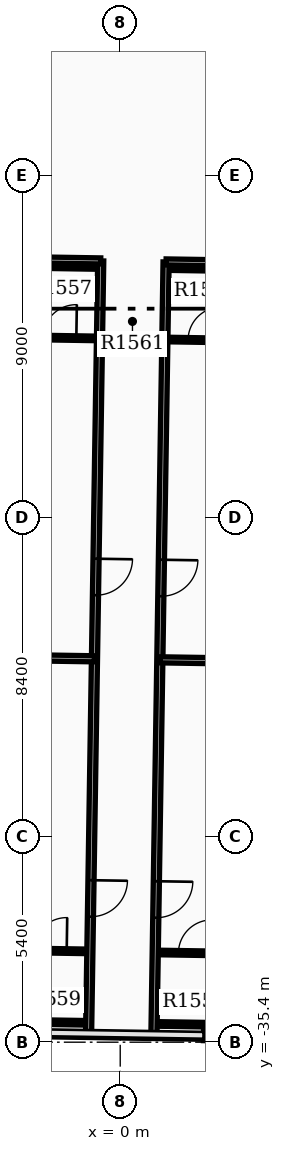
"""IFC4 building model, lengths in metres.
Left out: names, types, materials, properties, quantities, classifications, styles, units other than length and angle.
Written with IfcOpenShell. Run it as: python <this file> out.ifc"""

import sys

from ifc_helpers import new_model, si_unit, direction, frame, frame_2d, origin, place, context, subcontext, project, spatial, rectangle, extrude, element, fill, save


model = new_model("IFC4")
c1 = context("Model", 3, precision=1e-05, world=origin(), true_north=direction((0.0, 1.0)))
c2 = subcontext(c1, "Body", "Model", "MODEL_VIEW")
j1 = project(units=[si_unit("LENGTHUNIT", "METRE"), si_unit("PLANEANGLEUNIT", "RADIAN")], contexts=[c1])
p1 = place(None, origin())
s1 = spatial("IfcSite", under=j1, at=p1, CompositionType="ELEMENT")
p2 = place(p1, origin())
s2 = spatial("IfcBuilding", under=s1, at=p2, CompositionType="ELEMENT")
p3 = place(p2, frame((0.0, 0.0, 100.2)))
s3 = spatial("IfcBuildingStorey", under=s2, at=p3, CompositionType="ELEMENT", Elevation=100.2)
p4 = place(p3, frame((2.191, -35.219, 0.0), z_axis=(0.0, 0.0, 1.0), x_axis=(0.999876456275, -0.015718530042, 0.0)))
e1 = element("IfcWall", 1, at=p4, inside=s3, PredefinedType="STANDARD", context=c2, shape_type="SweptSolid", body=[
    extrude(rectangle(XDim=4.116, YDim=0.28, at=frame_2d((2.058, 0.0))), origin(), (0.0, 0.0, 1.0), 3.38),
])
p5 = place(p3, frame((1.207, -14.871, 0.0), z_axis=(0.0, 0.0, 1.0), x_axis=(-0.015707697811, -0.999876626504, 0.0)))
e2 = element("IfcWall", 2, at=p5, inside=s3, PredefinedType="PARTITIONING", context=c2, shape_type="SweptSolid", body=[
    extrude(rectangle(XDim=20.33, YDim=0.16, at=frame_2d((10.165, 0.0))), origin(), (0.0, 0.0, 1.0), 3.37),
])
p6 = place(p5, frame((7.836, 0.0, 0.0)))
e3 = element("IfcOpeningElement", 3, at=p6, cuts=e2, PredefinedType="OPENING", context=c2, shape_type="SweptSolid", body=[
    extrude(rectangle(XDim=0.96, YDim=2.15, at=frame_2d((0.48, 1.075))), frame((0.0, 0.09, 0.0), z_axis=(0.0, -1.0, 0.0), x_axis=(1.0, 0.0, 0.0)), (0.0, 0.0, 1.0), 0.18),
])
p7 = place(p5, frame((16.296, 0.0, 0.0)))
e4 = element("IfcOpeningElement", 4, at=p7, cuts=e2, PredefinedType="OPENING", context=c2, shape_type="SweptSolid", body=[
    extrude(rectangle(XDim=0.96, YDim=2.15, at=frame_2d((0.48, 1.075))), frame((0.0, 0.09, 0.0), z_axis=(0.0, -1.0, 0.0), x_axis=(1.0, 0.0, 0.0)), (0.0, 0.0, 1.0), 0.18),
])
p8 = place(p3, frame((1.207, -14.871, 0.0), z_axis=(0.0, 0.0, 1.0), x_axis=(0.999877138082, -0.015675099418, 0.0)))
e5 = element("IfcWall", 5, at=p8, inside=s3, PredefinedType="PARTITIONING", context=c2, shape_type="SweptSolid", body=[
    extrude(rectangle(XDim=5.28, YDim=0.16, at=frame_2d((2.64, 0.0))), origin(), (0.0, 0.0, 1.0), 3.37),
])
p9 = place(p3, frame((1.042, -25.34, 0.0), z_axis=(0.0, 0.0, 1.0), x_axis=(0.99987677651, -0.01569814626, 0.0)))
e6 = element("IfcWall", 6, at=p9, inside=s3, PredefinedType="PARTITIONING", context=c2, shape_type="SweptSolid", body=[
    extrude(rectangle(XDim=5.132, YDim=0.16, at=frame_2d((2.566, 0.0))), origin(), (0.0, 0.0, 1.0), 3.37),
])
p10 = place(p3, frame((1.314, -16.913, 0.0), z_axis=(0.0, 0.0, 1.0), x_axis=(0.999874722342, -0.015828443418, 0.0)))
e7 = element("IfcWall", 7, at=p10, inside=s3, PredefinedType="PARTITIONING", context=c2, shape_type="SweptSolid", body=[
    extrude(rectangle(XDim=1.82, YDim=0.12, at=frame_2d((0.91, 0.0))), origin(), (0.0, 0.0, 1.0), 3.37),
])
p11 = place(p10, frame((0.47, 0.0, 0.0)))
e8 = element("IfcOpeningElement", 8, at=p11, cuts=e7, PredefinedType="OPENING", context=c2, shape_type="SweptSolid", body=[
    extrude(rectangle(XDim=0.88, YDim=2.1, at=frame_2d((0.44, 1.05))), frame((0.0, 0.07, 0.0), z_axis=(0.0, -1.0, 0.0), x_axis=(1.0, 0.0, 0.0)), (0.0, 0.0, 1.0), 0.14),
])
p12 = place(p3, frame((1.344, -15.033, 0.0), z_axis=(0.0, 0.0, 1.0), x_axis=(0.999876836305, -0.015694337248, 0.0)))
e9 = element("IfcWall", 9, at=p12, inside=s3, PredefinedType="PARTITIONING", context=c2, shape_type="SweptSolid", body=[
    extrude(rectangle(XDim=1.82, YDim=0.12, at=frame_2d((0.91, 0.0))), origin(), (0.0, 0.0, 1.0), 3.37),
])
p13 = place(p3, frame((1.061, -33.041, 0.0), z_axis=(0.0, 0.0, 1.0), x_axis=(0.999876836305, -0.015694337248, 0.0)))
e10 = element("IfcWall", 10, at=p13, inside=s3, PredefinedType="PARTITIONING", context=c2, shape_type="SweptSolid", body=[
    extrude(rectangle(XDim=1.82, YDim=0.12, at=frame_2d((0.91, 0.0))), origin(), (0.0, 0.0, 1.0), 3.37),
])
p14 = place(p13, frame((0.47, 0.0, 0.0)))
e11 = element("IfcOpeningElement", 11, at=p14, cuts=e10, PredefinedType="OPENING", context=c2, shape_type="SweptSolid", body=[
    extrude(rectangle(XDim=0.88, YDim=2.1, at=frame_2d((0.44, 1.05))), frame((0.0, 0.07, 0.0), z_axis=(0.0, -1.0, 0.0), x_axis=(1.0, 0.0, 0.0)), (0.0, 0.0, 1.0), 0.14),
])
p15 = place(p3, frame((1.031, -34.92, 0.0), z_axis=(0.0, 0.0, 1.0), x_axis=(0.999874722342, -0.015828443418, 0.0)))
e12 = element("IfcWall", 12, at=p15, inside=s3, PredefinedType="PARTITIONING", context=c2, shape_type="SweptSolid", body=[
    extrude(rectangle(XDim=1.82, YDim=0.12, at=frame_2d((0.91, 0.0))), origin(), (0.0, 0.0, 1.0), 3.37),
])
p16 = place(p3, frame((-0.513, -14.844, 0.0), z_axis=(0.0, 0.0, 1.0), x_axis=(-0.015707509204, -0.999876629467, 0.0)))
e13 = element("IfcWall", 13, at=p16, inside=s3, PredefinedType="PARTITIONING", context=c2, shape_type="SweptSolid", body=[
    extrude(rectangle(XDim=20.33, YDim=0.16, at=frame_2d((10.165, 0.0))), origin(), (0.0, 0.0, 1.0), 3.37),
])
p17 = place(p16, frame((7.836, 0.0, 0.0)))
e14 = element("IfcOpeningElement", 14, at=p17, cuts=e13, PredefinedType="OPENING", context=c2, shape_type="SweptSolid", body=[
    extrude(rectangle(XDim=0.96, YDim=2.15, at=frame_2d((0.48, 1.075))), frame((0.0, 0.09, 0.0), z_axis=(0.0, -1.0, 0.0), x_axis=(1.0, 0.0, 0.0)), (0.0, 0.0, 1.0), 0.18),
])
p18 = place(p16, frame((16.296, 0.0, 0.0)))
e15 = element("IfcOpeningElement", 15, at=p18, cuts=e13, PredefinedType="OPENING", context=c2, shape_type="SweptSolid", body=[
    extrude(rectangle(XDim=0.96, YDim=2.15, at=frame_2d((0.48, 1.075))), frame((0.0, 0.09, 0.0), z_axis=(0.0, -1.0, 0.0), x_axis=(1.0, 0.0, 0.0)), (0.0, 0.0, 1.0), 0.18),
])
p19 = place(p3, frame((-0.513, -14.844, 0.0), z_axis=(0.0, 0.0, 1.0), x_axis=(-0.99987682984, 0.015694749102, 0.0)))
e16 = element("IfcWall", 16, at=p19, inside=s3, PredefinedType="PARTITIONING", context=c2, shape_type="SweptSolid", body=[
    extrude(rectangle(XDim=6.44, YDim=0.16, at=frame_2d((3.22, 0.0))), origin(), (0.0, 0.0, 1.0), 3.37),
])
p20 = place(p3, frame((-0.678, -25.312, 0.0), z_axis=(0.0, 0.0, 1.0), x_axis=(-0.999876517768, 0.01571461794, 0.0)))
e17 = element("IfcWall", 17, at=p20, inside=s3, PredefinedType="PARTITIONING", context=c2, shape_type="SweptSolid", body=[
    extrude(rectangle(XDim=6.292, YDim=0.16, at=frame_2d((3.146, 0.0))), origin(), (0.0, 0.0, 1.0), 3.37),
])
p21 = place(p3, frame((-2.505, -16.853, 0.0), z_axis=(0.0, 0.0, 1.0), x_axis=(0.999876803258, -0.015696442504, 0.0)))
e18 = element("IfcWall", 18, at=p21, inside=s3, PredefinedType="PARTITIONING", context=c2, shape_type="SweptSolid", body=[
    extrude(rectangle(XDim=1.82, YDim=0.12, at=frame_2d((0.91, 0.0))), origin(), (0.0, 0.0, 1.0), 3.37),
])
p22 = place(p21, frame((0.47, 0.0, 0.0)))
e19 = element("IfcOpeningElement", 19, at=p22, cuts=e18, PredefinedType="OPENING", context=c2, shape_type="SweptSolid", body=[
    extrude(rectangle(XDim=0.88, YDim=2.1, at=frame_2d((0.44, 1.05))), frame((0.0, 0.07, 0.0), z_axis=(0.0, -1.0, 0.0), x_axis=(1.0, 0.0, 0.0)), (0.0, 0.0, 1.0), 0.14),
])
p23 = place(p3, frame((-2.476, -14.973, 0.0), z_axis=(0.0, 0.0, 1.0), x_axis=(0.999874722342, -0.015828443418, 0.0)))
e20 = element("IfcWall", 20, at=p23, inside=s3, PredefinedType="PARTITIONING", context=c2, shape_type="SweptSolid", body=[
    extrude(rectangle(XDim=1.82, YDim=0.12, at=frame_2d((0.91, 0.0))), origin(), (0.0, 0.0, 1.0), 3.37),
])
p24 = place(p3, frame((-2.758, -32.981, 0.0), z_axis=(0.0, 0.0, 1.0), x_axis=(0.999876803258, -0.015696442504, 0.0)))
e21 = element("IfcWall", 21, at=p24, inside=s3, PredefinedType="PARTITIONING", context=c2, shape_type="SweptSolid", body=[
    extrude(rectangle(XDim=1.82, YDim=0.12, at=frame_2d((0.91, 0.0))), origin(), (0.0, 0.0, 1.0), 3.37),
])
p25 = place(p24, frame((0.47, 0.0, 0.0)))
e22 = element("IfcOpeningElement", 22, at=p25, cuts=e21, PredefinedType="OPENING", context=c2, shape_type="SweptSolid", body=[
    extrude(rectangle(XDim=0.88, YDim=2.1, at=frame_2d((0.44, 1.05))), frame((0.0, 0.07, 0.0), z_axis=(0.0, -1.0, 0.0), x_axis=(1.0, 0.0, 0.0)), (0.0, 0.0, 1.0), 0.14),
])
p26 = place(p3, frame((-2.788, -34.861, 0.0), z_axis=(0.0, 0.0, 1.0), x_axis=(0.999876836305, -0.015694337248, 0.0)))
e23 = element("IfcWall", 23, at=p26, inside=s3, PredefinedType="PARTITIONING", context=c2, shape_type="SweptSolid", body=[
    extrude(rectangle(XDim=1.82, YDim=0.12, at=frame_2d((0.91, 0.0))), origin(), (0.0, 0.0, 1.0), 3.37),
])
p27 = place(p6, origin())
e24 = element("IfcDoor", 24, at=p27, inside=s3, OperationType="SINGLE_SWING_LEFT", PredefinedType="DOOR", context=c2, shape_type="SweptSolid", body=[
    extrude(rectangle(XDim=0.96, YDim=2.15, at=frame_2d((0.48, 1.075))), frame((0.0, 0.025, 0.0), z_axis=(0.0, -1.0, 0.0), x_axis=(1.0, 0.0, 0.0)), (0.0, 0.0, 1.0), 0.05),
])
fill(e3, e24)
p28 = place(p11, origin())
e25 = element("IfcDoor", 25, at=p28, inside=s3, OperationType="SINGLE_SWING_RIGHT", PredefinedType="DOOR", context=c2, shape_type="SweptSolid", body=[
    extrude(rectangle(XDim=0.88, YDim=2.1, at=frame_2d((0.44, 1.05))), frame((0.0, 0.025, 0.0), z_axis=(0.0, -1.0, 0.0), x_axis=(1.0, 0.0, 0.0)), (0.0, 0.0, 1.0), 0.05),
])
fill(e8, e25)
p29 = place(p7, origin())
e26 = element("IfcDoor", 26, at=p29, inside=s3, OperationType="SINGLE_SWING_LEFT", PredefinedType="DOOR", context=c2, shape_type="SweptSolid", body=[
    extrude(rectangle(XDim=0.96, YDim=2.15, at=frame_2d((0.48, 1.075))), frame((0.0, 0.025, 0.0), z_axis=(0.0, -1.0, 0.0), x_axis=(1.0, 0.0, 0.0)), (0.0, 0.0, 1.0), 0.05),
])
fill(e4, e26)
p30 = place(p14, origin())
e27 = element("IfcDoor", 27, at=p30, inside=s3, OperationType="SINGLE_SWING_RIGHT", PredefinedType="DOOR", context=c2, shape_type="SweptSolid", body=[
    extrude(rectangle(XDim=0.88, YDim=2.1, at=frame_2d((0.44, 1.05))), frame((0.0, 0.025, 0.0), z_axis=(0.0, -1.0, 0.0), x_axis=(1.0, 0.0, 0.0)), (0.0, 0.0, 1.0), 0.05),
])
fill(e11, e27)
p31 = place(p17, origin())
e28 = element("IfcDoor", 28, at=p31, inside=s3, OperationType="SINGLE_SWING_LEFT", PredefinedType="DOOR", context=c2, shape_type="SweptSolid", body=[
    extrude(rectangle(XDim=0.96, YDim=2.15, at=frame_2d((0.48, 1.075))), frame((0.0, 0.025, 0.0), z_axis=(0.0, -1.0, 0.0), x_axis=(1.0, 0.0, 0.0)), (0.0, 0.0, 1.0), 0.05),
])
fill(e14, e28)
p32 = place(p22, origin())
e29 = element("IfcDoor", 29, at=p32, inside=s3, OperationType="SINGLE_SWING_RIGHT", PredefinedType="DOOR", context=c2, shape_type="SweptSolid", body=[
    extrude(rectangle(XDim=0.88, YDim=2.1, at=frame_2d((0.44, 1.05))), frame((0.0, 0.025, 0.0), z_axis=(0.0, -1.0, 0.0), x_axis=(1.0, 0.0, 0.0)), (0.0, 0.0, 1.0), 0.05),
])
fill(e19, e29)
p33 = place(p18, origin())
e30 = element("IfcDoor", 30, at=p33, inside=s3, OperationType="SINGLE_SWING_LEFT", PredefinedType="DOOR", context=c2, shape_type="SweptSolid", body=[
    extrude(rectangle(XDim=0.96, YDim=2.15, at=frame_2d((0.48, 1.075))), frame((0.0, 0.025, 0.0), z_axis=(0.0, -1.0, 0.0), x_axis=(1.0, 0.0, 0.0)), (0.0, 0.0, 1.0), 0.05),
])
fill(e15, e30)
p34 = place(p25, origin())
e31 = element("IfcDoor", 31, at=p34, inside=s3, OperationType="SINGLE_SWING_RIGHT", PredefinedType="DOOR", context=c2, shape_type="SweptSolid", body=[
    extrude(rectangle(XDim=0.88, YDim=2.1, at=frame_2d((0.44, 1.05))), frame((0.0, 0.025, 0.0), z_axis=(0.0, -1.0, 0.0), x_axis=(1.0, 0.0, 0.0)), (0.0, 0.0, 1.0), 0.05),
])
fill(e22, e31)
save(model, sys.argv[1])
